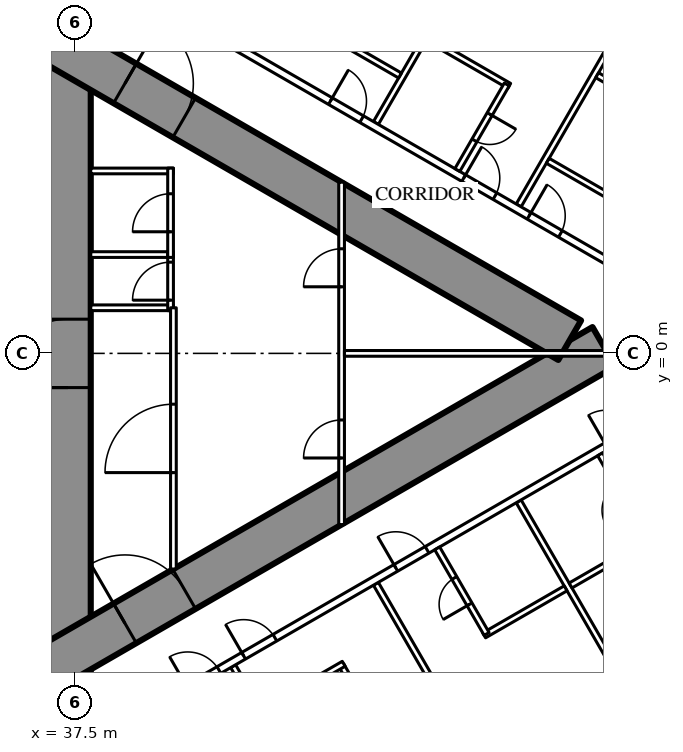
"""IFC4 building model, lengths in metres.
Left out: names, types, materials, properties, quantities, classifications, styles, units other than length and angle.
Written with IfcOpenShell. Run it as: python <this file> out.ifc"""

import sys

from ifc_helpers import new_model, si_unit, direction, frame, frame_2d, origin, place, context, subcontext, project, spatial, rectangle, extrude, element, fill, save


model = new_model("IFC4")
c1 = context("Model", 3, precision=1e-05, world=origin(), true_north=direction((0.0, 1.0)))
c2 = subcontext(c1, "Body", "Model", "MODEL_VIEW")
j1 = project(units=[si_unit("LENGTHUNIT", "METRE"), si_unit("PLANEANGLEUNIT", "RADIAN")], contexts=[c1])
p1 = place(None, origin())
s1 = spatial("IfcSite", under=j1, at=p1, CompositionType="ELEMENT")
p2 = place(p1, origin())
s2 = spatial("IfcBuilding", under=s1, at=p2, CompositionType="ELEMENT")
p3 = place(p2, frame((0.0, 0.0, 32.0)))
s3 = spatial("IfcBuildingStorey", under=s2, at=p3, CompositionType="ELEMENT", Elevation=32.0)
p4 = place(p3, frame((37.3, -8.6, 0.0), z_axis=(0.0, 0.0, 1.0), x_axis=(0.0, 1.0, 0.0)))
e1 = element("IfcWall", 1, at=p4, inside=s3, PredefinedType="SHEAR", context=c2, shape_type="SweptSolid", body=[
    extrude(rectangle(XDim=17.2, YDim=1.2, at=frame_2d((8.6, 0.0))), origin(), (0.0, 0.0, 1.0), 3.5),
])
p5 = place(p4, frame((7.7, 0.0, 0.0)))
e2 = element("IfcOpeningElement", 2, at=p5, cuts=e1, PredefinedType="OPENING", context=c2, shape_type="SweptSolid", body=[
    extrude(rectangle(XDim=1.8, YDim=2.2, at=frame_2d((0.9, 1.1))), frame((0.0, 0.61, 0.0), z_axis=(0.0, -1.0, 0.0), x_axis=(1.0, 0.0, 0.0)), (0.0, 0.0, 1.0), 1.22),
])
p6 = place(p3, frame((27.2, -13.8, 0.0), z_axis=(0.0, 0.0, 1.0), x_axis=(0.866027159892, 0.499996958321, 0.0)))
e3 = element("IfcWall", 3, at=p6, inside=s3, PredefinedType="SHEAR", context=c2, shape_type="SweptSolid", body=[
    extrude(rectangle(XDim=27.947, YDim=1.2, at=frame_2d((13.973, 0.0))), origin(), (0.0, 0.0, 1.0), 3.5),
])
p7 = place(p6, frame((4.6, 0.0, 0.0)))
e4 = element("IfcOpeningElement", 4, at=p7, cuts=e3, PredefinedType="OPENING", context=c2, shape_type="SweptSolid", body=[
    extrude(rectangle(XDim=1.0, YDim=2.2, at=frame_2d((0.5, 1.1))), frame((0.0, 0.61, 0.0), z_axis=(0.0, -1.0, 0.0), x_axis=(1.0, 0.0, 0.0)), (0.0, 0.0, 1.0), 1.22),
])
p8 = place(p6, frame((13.395, 0.0, 0.0)))
e5 = element("IfcOpeningElement", 5, at=p8, cuts=e3, PredefinedType="OPENING", context=c2, shape_type="SweptSolid", body=[
    extrude(rectangle(XDim=1.8, YDim=2.2, at=frame_2d((0.9, 1.1))), frame((0.0, 0.61, 0.0), z_axis=(0.0, -1.0, 0.0), x_axis=(1.0, 0.0, 0.0)), (0.0, 0.0, 1.0), 1.22),
])
p9 = place(p3, frame((27.2, 13.8, 0.0), z_axis=(0.0, 0.0, 1.0), x_axis=(0.866024515034, -0.500001539357, 0.0)))
e6 = element("IfcWall", 6, at=p9, inside=s3, PredefinedType="SHEAR", context=c2, shape_type="SweptSolid", body=[
    extrude(rectangle(XDim=26.907, YDim=1.2, at=frame_2d((13.454, 0.0))), origin(), (0.0, 0.0, 1.0), 3.5),
])
p10 = place(p9, frame((4.6, 0.0, 0.0)))
e7 = element("IfcOpeningElement", 7, at=p10, cuts=e6, PredefinedType="OPENING", context=c2, shape_type="SweptSolid", body=[
    extrude(rectangle(XDim=1.0, YDim=2.2, at=frame_2d((0.5, 1.1))), frame((0.0, 0.61, 0.0), z_axis=(0.0, -1.0, 0.0), x_axis=(1.0, 0.0, 0.0)), (0.0, 0.0, 1.0), 1.22),
])
p11 = place(p9, frame((13.395, 0.0, 0.0)))
e8 = element("IfcOpeningElement", 8, at=p11, cuts=e6, PredefinedType="OPENING", context=c2, shape_type="SweptSolid", body=[
    extrude(rectangle(XDim=1.8, YDim=2.2, at=frame_2d((0.9, 1.1))), frame((0.0, 0.61, 0.0), z_axis=(0.0, -1.0, 0.0), x_axis=(1.0, 0.0, 0.0)), (0.0, 0.0, 1.0), 1.22),
])
p12 = place(p3, frame((41.647, -8.23, 0.0), z_axis=(0.0, 0.0, 1.0), x_axis=(0.49998590462, -0.866033541603, 0.0)))
e9 = element("IfcWall", 9, at=p12, inside=s3, PredefinedType="PARTITIONING", context=c2, shape_type="SweptSolid", body=[
    extrude(rectangle(XDim=12.621, YDim=0.15, at=frame_2d((6.311, 0.0))), origin(), (0.0, 0.0, 1.0), 3.25),
])
p13 = place(p3, frame((45.403, -6.062, 0.0), z_axis=(0.0, 0.0, 1.0), x_axis=(0.500007077968, -0.866021317279, 0.0)))
e10 = element("IfcWall", 10, at=p13, inside=s3, PredefinedType="PARTITIONING", context=c2, shape_type="SweptSolid", body=[
    extrude(rectangle(XDim=12.721, YDim=0.15, at=frame_2d((6.361, 0.0))), origin(), (0.0, 0.0, 1.0), 3.25),
])
p14 = place(p3, frame((49.159, -3.893, 0.0), z_axis=(0.0, 0.0, 1.0), x_axis=(0.499998773722, -0.866026111775, 0.0)))
e11 = element("IfcWall", 11, at=p14, inside=s3, PredefinedType="PARTITIONING", context=c2, shape_type="SweptSolid", body=[
    extrude(rectangle(XDim=9.892, YDim=0.15, at=frame_2d((4.946, 0.0))), origin(), (0.0, 0.0, 1.0), 2.25),
])
p15 = place(p3, frame((45.403, 6.062, 0.0), z_axis=(0.0, 0.0, 1.0), x_axis=(0.500013434677, 0.866017647131, 0.0)))
e12 = element("IfcWall", 12, at=p15, inside=s3, PredefinedType="PARTITIONING", context=c2, shape_type="SweptSolid", body=[
    extrude(rectangle(XDim=9.902, YDim=0.15, at=frame_2d((4.951, 0.0))), origin(), (0.0, 0.0, 1.0), 2.25),
])
p16 = place(p3, frame((49.159, 3.893, 0.0), z_axis=(0.0, 0.0, 1.0), x_axis=(0.499995664361, 0.866027906952, 0.0)))
e13 = element("IfcWall", 13, at=p16, inside=s3, PredefinedType="PARTITIONING", context=c2, shape_type="SweptSolid", body=[
    extrude(rectangle(XDim=12.711, YDim=0.15, at=frame_2d((6.356, 0.0))), origin(), (0.0, 0.0, 1.0), 3.25),
])
p17 = place(p3, frame((37.96, -10.243, 0.0), z_axis=(0.0, 0.0, 1.0), x_axis=(0.866026429433, 0.499998223521, 0.0)))
e14 = element("IfcWall", 14, at=p17, inside=s3, PredefinedType="PARTITIONING", context=c2, shape_type="SweptSolid", body=[
    extrude(rectangle(XDim=20.487, YDim=0.2, at=frame_2d((10.243, 0.0))), origin(), (0.0, 0.0, 1.0), 3.25),
])
p18 = place(p17, frame((4.575, 0.0, 0.0)))
e15 = element("IfcOpeningElement", 15, at=p18, cuts=e14, PredefinedType="OPENING", context=c2, shape_type="SweptSolid", body=[
    extrude(rectangle(XDim=0.95, YDim=2.2, at=frame_2d((0.475, 1.1))), frame((0.0, 0.11, 0.0), z_axis=(0.0, -1.0, 0.0), x_axis=(1.0, 0.0, 0.0)), (0.0, 0.0, 1.0), 0.22),
])
p19 = place(p17, frame((9.199, 0.0, 0.0)))
e16 = element("IfcOpeningElement", 16, at=p19, cuts=e14, PredefinedType="OPENING", context=c2, shape_type="SweptSolid", body=[
    extrude(rectangle(XDim=0.95, YDim=2.2, at=frame_2d((0.475, 1.1))), frame((0.0, 0.11, 0.0), z_axis=(0.0, -1.0, 0.0), x_axis=(1.0, 0.0, 0.0)), (0.0, 0.0, 1.0), 0.22),
])
p20 = place(p17, frame((15.599, 0.0, 0.0)))
e17 = element("IfcOpeningElement", 17, at=p20, cuts=e14, PredefinedType="OPENING", context=c2, shape_type="SweptSolid", body=[
    extrude(rectangle(XDim=0.95, YDim=2.2, at=frame_2d((0.475, 1.1))), frame((0.0, 0.11, 0.0), z_axis=(0.0, -1.0, 0.0), x_axis=(1.0, 0.0, 0.0)), (0.0, 0.0, 1.0), 0.22),
])
p21 = place(p17, frame((2.875, 0.0, 0.0)))
e18 = element("IfcOpeningElement", 18, at=p21, cuts=e14, PredefinedType="OPENING", context=c2, shape_type="SweptSolid", body=[
    extrude(rectangle(XDim=0.95, YDim=2.2, at=frame_2d((0.475, 1.1))), frame((0.0, 0.11, 0.0), z_axis=(0.0, -1.0, 0.0), x_axis=(1.0, 0.0, 0.0)), (0.0, 0.0, 1.0), 0.22),
])
p22 = place(p3, frame((41.619, 8.131, 0.0), z_axis=(0.0, 0.0, 1.0), x_axis=(0.86603245327, -0.499987789734, 0.0)))
e19 = element("IfcWall", 19, at=p22, inside=s3, PredefinedType="PARTITIONING", context=c2, shape_type="SweptSolid", body=[
    extrude(rectangle(XDim=16.142, YDim=0.2, at=frame_2d((8.071, 0.0))), origin(), (0.0, 0.0, 1.0), 3.25),
])
p23 = place(p22, frame((9.024, 0.0, 0.0)))
e20 = element("IfcOpeningElement", 20, at=p23, cuts=e19, PredefinedType="OPENING", context=c2, shape_type="SweptSolid", body=[
    extrude(rectangle(XDim=0.95, YDim=2.2, at=frame_2d((0.475, 1.1))), frame((0.0, 0.11, 0.0), z_axis=(0.0, -1.0, 0.0), x_axis=(1.0, 0.0, 0.0)), (0.0, 0.0, 1.0), 0.22),
])
p24 = place(p22, frame((7.037, 0.0, 0.0)))
e21 = element("IfcOpeningElement", 21, at=p24, cuts=e19, PredefinedType="OPENING", context=c2, shape_type="SweptSolid", body=[
    extrude(rectangle(XDim=0.95, YDim=2.2, at=frame_2d((0.475, 1.1))), frame((0.0, 0.11, 0.0), z_axis=(0.0, -1.0, 0.0), x_axis=(1.0, 0.0, 0.0)), (0.0, 0.0, 1.0), 0.22),
])
p25 = place(p22, frame((2.987, 0.0, 0.0)))
e22 = element("IfcOpeningElement", 22, at=p25, cuts=e19, PredefinedType="OPENING", context=c2, shape_type="SweptSolid", body=[
    extrude(rectangle(XDim=0.95, YDim=2.2, at=frame_2d((0.475, 1.1))), frame((0.0, 0.11, 0.0), z_axis=(0.0, -1.0, 0.0), x_axis=(1.0, 0.0, 0.0)), (0.0, 0.0, 1.0), 0.22),
])
p26 = place(p3, frame((44.491, -8.205, 0.0), z_axis=(0.0, 0.0, 1.0), x_axis=(0.500047596559, -0.865997922154, 0.0)))
e23 = element("IfcWall", 23, at=p26, inside=s3, PredefinedType="PARTITIONING", context=c2, shape_type="SweptSolid", body=[
    extrude(rectangle(XDim=2.6, YDim=0.15, at=frame_2d((1.3, 0.0))), origin(), (0.0, 0.0, 1.0), 3.25),
])
p27 = place(p26, frame((0.9, 0.0, 0.0)))
e24 = element("IfcOpeningElement", 24, at=p27, cuts=e23, PredefinedType="OPENING", context=c2, shape_type="SweptSolid", body=[
    extrude(rectangle(XDim=0.8, YDim=2.2, at=frame_2d((0.4, 1.1))), frame((0.0, 0.085, 0.0), z_axis=(0.0, -1.0, 0.0), x_axis=(1.0, 0.0, 0.0)), (0.0, 0.0, 1.0), 0.17),
])
for number, where, z_axis, x_axis in (
    (25, (42.412, -9.405, 0.0), (0.0, 0.0, 1.0), (0.866, 0.5, 0.0)),
    (26, (48.251, -7.42, 0.0), (0.0, 0.0, 1.0), (0.866, 0.5, 0.0)),
):
    element("IfcWall", number, at=place(p3, frame(where, z_axis=z_axis, x_axis=x_axis)), inside=s3, PredefinedType="PARTITIONING", context=c2, shape_type="SweptSolid", body=[
        extrude(rectangle(XDim=2.475, YDim=0.15, at=frame_2d((1.237, 0.0))), origin(), (0.0, 0.0, 1.0), 3.25),
    ])
p28 = place(p3, frame((47.016, -5.13, 0.0), z_axis=(0.0, 0.0, 1.0), x_axis=(0.500006934395, -0.866021400173, 0.0)))
e27 = element("IfcWall", 27, at=p28, inside=s3, PredefinedType="PARTITIONING", context=c2, shape_type="SweptSolid", body=[
    extrude(rectangle(XDim=2.6, YDim=0.15, at=frame_2d((1.3, 0.0))), origin(), (0.0, 0.0, 1.0), 3.25),
])
p29 = place(p28, frame((0.9, 0.0, 0.0)))
e28 = element("IfcOpeningElement", 28, at=p29, cuts=e27, PredefinedType="OPENING", context=c2, shape_type="SweptSolid", body=[
    extrude(rectangle(XDim=0.8, YDim=2.2, at=frame_2d((0.4, 1.1))), frame((0.0, 0.085, 0.0), z_axis=(0.0, -1.0, 0.0), x_axis=(1.0, 0.0, 0.0)), (0.0, 0.0, 1.0), 0.17),
])
p30 = place(p3, frame((50.524, -6.107, 0.0), z_axis=(0.0, 0.0, 1.0), x_axis=(0.866031185235, 0.4999899861, 0.0)))
e29 = element("IfcWall", 29, at=p30, inside=s3, PredefinedType="PARTITIONING", context=c2, shape_type="SweptSolid", body=[
    extrude(rectangle(XDim=2.475, YDim=0.15, at=frame_2d((1.238, 0.0))), origin(), (0.0, 0.0, 1.0), 3.25),
])
p31 = place(p3, frame((51.303, -2.656, 0.0), z_axis=(0.0, 0.0, 1.0), x_axis=(0.500047596559, -0.865997922154, 0.0)))
e30 = element("IfcWall", 30, at=p31, inside=s3, PredefinedType="PARTITIONING", context=c2, shape_type="SweptSolid", body=[
    extrude(rectangle(XDim=2.6, YDim=0.15, at=frame_2d((1.3, 0.0))), origin(), (0.0, 0.0, 1.0), 3.25),
])
p32 = place(p31, frame((0.9, 0.0, 0.0)))
e31 = element("IfcOpeningElement", 31, at=p32, cuts=e30, PredefinedType="OPENING", context=c2, shape_type="SweptSolid", body=[
    extrude(rectangle(XDim=0.8, YDim=2.2, at=frame_2d((0.4, 1.1))), frame((0.0, 0.085, 0.0), z_axis=(0.0, -1.0, 0.0), x_axis=(1.0, 0.0, 0.0)), (0.0, 0.0, 1.0), 0.17),
])
p33 = place(p3, frame((51.224, 7.32, 0.0), z_axis=(0.0, 0.0, 1.0), x_axis=(0.866031185235, -0.4999899861, 0.0)))
e32 = element("IfcWall", 32, at=p33, inside=s3, PredefinedType="PARTITIONING", context=c2, shape_type="SweptSolid", body=[
    extrude(rectangle(XDim=2.475, YDim=0.15, at=frame_2d((1.238, 0.0))), origin(), (0.0, 0.0, 1.0), 3.25),
])
p34 = place(p3, frame((49.925, 5.068, 0.0), z_axis=(0.0, 0.0, 1.0), x_axis=(0.866006523861, -0.500032699561, 0.0)))
e33 = element("IfcWall", 33, at=p34, inside=s3, PredefinedType="PARTITIONING", context=c2, shape_type="SweptSolid", body=[
    extrude(rectangle(XDim=2.475, YDim=0.15, at=frame_2d((1.237, 0.0))), origin(), (0.0, 0.0, 1.0), 3.25),
])
p35 = place(p3, frame((46.768, 8.276, 0.0), z_axis=(0.0, 0.0, 1.0), x_axis=(0.866031185235, -0.4999899861, 0.0)))
e34 = element("IfcWall", 34, at=p35, inside=s3, PredefinedType="PARTITIONING", context=c2, shape_type="SweptSolid", body=[
    extrude(rectangle(XDim=2.475, YDim=0.15, at=frame_2d((1.238, 0.0))), origin(), (0.0, 0.0, 1.0), 3.25),
])
p36 = place(p3, frame((47.546, 4.824, 0.0), z_axis=(0.0, 0.0, 1.0), x_axis=(0.500006934395, 0.866021400173, 0.0)))
e35 = element("IfcWall", 35, at=p36, inside=s3, PredefinedType="PARTITIONING", context=c2, shape_type="SweptSolid", body=[
    extrude(rectangle(XDim=2.6, YDim=0.15, at=frame_2d((1.3, 0.0))), origin(), (0.0, 0.0, 1.0), 3.25),
])
p37 = place(p36, frame((0.9, 0.0, 0.0)))
e36 = element("IfcOpeningElement", 36, at=p37, cuts=e35, PredefinedType="OPENING", context=c2, shape_type="SweptSolid", body=[
    extrude(rectangle(XDim=0.8, YDim=2.2, at=frame_2d((0.4, 1.1))), frame((0.0, 0.085, 0.0), z_axis=(0.0, -1.0, 0.0), x_axis=(1.0, 0.0, 0.0)), (0.0, 0.0, 1.0), 0.17),
])
p38 = place(p3, frame((43.895, 8.549, 0.0), z_axis=(0.0, 0.0, 1.0), x_axis=(0.866031185235, -0.4999899861, 0.0)))
e37 = element("IfcWall", 37, at=p38, inside=s3, PredefinedType="PARTITIONING", context=c2, shape_type="SweptSolid", body=[
    extrude(rectangle(XDim=2.475, YDim=0.15, at=frame_2d((1.238, 0.0))), origin(), (0.0, 0.0, 1.0), 3.25),
])
for number, where, z_axis, x_axis in (
    (38, (37.9, 1.2, 0.0), (0.0, 0.0, 1.0), (1.0, 0.0, 0.0)),
    (39, (37.9, 2.6, 0.0), (0.0, 0.0, 1.0), (1.0, 0.0, 0.0)),
    (40, (37.9, 4.8, 0.0), (0.0, 0.0, 1.0), (1.0, 0.0, 0.0)),
):
    element("IfcWall", number, at=place(p3, frame(where, z_axis=z_axis, x_axis=x_axis)), inside=s3, PredefinedType="PARTITIONING", context=c2, shape_type="SweptSolid", body=[
        extrude(rectangle(XDim=2.175, YDim=0.15, at=frame_2d((1.087, 0.0))), origin(), (0.0, 0.0, 1.0), 3.25),
    ])
p39 = place(p3, frame((40.0, 1.125, 0.0), z_axis=(0.0, 0.0, 1.0), x_axis=(0.0, 1.0, 0.0)))
e41 = element("IfcWall", 41, at=p39, inside=s3, PredefinedType="PARTITIONING", context=c2, shape_type="SweptSolid", body=[
    extrude(rectangle(XDim=1.55, YDim=0.15, at=frame_2d((0.775, 0.0))), origin(), (0.0, 0.0, 1.0), 3.25),
])
p40 = place(p39, frame((0.275, 0.0, 0.0)))
e42 = element("IfcOpeningElement", 42, at=p40, cuts=e41, PredefinedType="OPENING", context=c2, shape_type="SweptSolid", body=[
    extrude(rectangle(XDim=1.0, YDim=2.2, at=frame_2d((0.5, 1.1))), frame((0.0, 0.085, 0.0), z_axis=(0.0, -1.0, 0.0), x_axis=(1.0, 0.0, 0.0)), (0.0, 0.0, 1.0), 0.17),
])
p41 = place(p3, frame((40.0, 2.525, 0.0), z_axis=(0.0, 0.0, 1.0), x_axis=(0.0, 1.0, 0.0)))
e43 = element("IfcWall", 43, at=p41, inside=s3, PredefinedType="PARTITIONING", context=c2, shape_type="SweptSolid", body=[
    extrude(rectangle(XDim=2.35, YDim=0.15, at=frame_2d((1.175, 0.0))), origin(), (0.0, 0.0, 1.0), 3.25),
])
p42 = place(p41, frame((0.675, 0.0, 0.0)))
e44 = element("IfcOpeningElement", 44, at=p42, cuts=e43, PredefinedType="OPENING", context=c2, shape_type="SweptSolid", body=[
    extrude(rectangle(XDim=1.0, YDim=2.2, at=frame_2d((0.5, 1.1))), frame((0.0, 0.085, 0.0), z_axis=(0.0, -1.0, 0.0), x_axis=(1.0, 0.0, 0.0)), (0.0, 0.0, 1.0), 0.17),
])
p43 = place(p3, frame((40.075, -5.674, 0.0), z_axis=(0.0, 0.0, 1.0), x_axis=(0.0, 1.0, 0.0)))
e45 = element("IfcWall", 45, at=p43, inside=s3, PredefinedType="PARTITIONING", context=c2, shape_type="SweptSolid", body=[
    extrude(rectangle(XDim=6.874, YDim=0.15, at=frame_2d((3.437, 0.0))), origin(), (0.0, 0.0, 1.0), 3.25),
])
p44 = place(p43, frame((2.537, 0.0, 0.0)))
e46 = element("IfcOpeningElement", 46, at=p44, cuts=e45, PredefinedType="OPENING", context=c2, shape_type="SweptSolid", body=[
    extrude(rectangle(XDim=1.8, YDim=2.2, at=frame_2d((0.9, 1.1))), frame((0.0, 0.085, 0.0), z_axis=(0.0, -1.0, 0.0), x_axis=(1.0, 0.0, 0.0)), (0.0, 0.0, 1.0), 0.17),
])
p45 = place(p3, frame((44.5, -4.505, 0.0), z_axis=(0.0, 0.0, 1.0), x_axis=(0.0, 1.0, 0.0)))
e47 = element("IfcWall", 47, at=p45, inside=s3, PredefinedType="PARTITIONING", context=c2, shape_type="SweptSolid", body=[
    extrude(rectangle(XDim=9.009, YDim=0.15, at=frame_2d((4.505, 0.0))), origin(), (0.0, 0.0, 1.0), 2.45),
])
p46 = place(p45, frame((1.752, 0.0, 0.0)))
e48 = element("IfcOpeningElement", 48, at=p46, cuts=e47, PredefinedType="OPENING", context=c2, shape_type="SweptSolid", body=[
    extrude(rectangle(XDim=1.0, YDim=2.2, at=frame_2d((0.5, 1.1))), frame((0.0, 0.085, 0.0), z_axis=(0.0, -1.0, 0.0), x_axis=(1.0, 0.0, 0.0)), (0.0, 0.0, 1.0), 0.17),
])
p47 = place(p45, frame((6.257, 0.0, 0.0)))
e49 = element("IfcOpeningElement", 49, at=p47, cuts=e47, PredefinedType="OPENING", context=c2, shape_type="SweptSolid", body=[
    extrude(rectangle(XDim=1.0, YDim=2.2, at=frame_2d((0.5, 1.1))), frame((0.0, 0.085, 0.0), z_axis=(0.0, -1.0, 0.0), x_axis=(1.0, 0.0, 0.0)), (0.0, 0.0, 1.0), 0.17),
])
p48 = place(p3, frame((44.575, 0.0, 0.0), z_axis=(0.0, 0.0, 1.0), x_axis=(1.0, 0.0, 0.0)))
e50 = element("IfcWall", 50, at=p48, inside=s3, PredefinedType="PARTITIONING", context=c2, shape_type="SweptSolid", body=[
    extrude(rectangle(XDim=7.727, YDim=0.15, at=frame_2d((3.864, 0.0))), origin(), (0.0, 0.0, 1.0), 2.25),
])
p49 = place(p18, origin())
e51 = element("IfcDoor", 51, at=p49, inside=s3, OperationType="SINGLE_SWING_LEFT", PredefinedType="DOOR", context=c2, shape_type="SweptSolid", body=[
    extrude(rectangle(XDim=0.95, YDim=2.2, at=frame_2d((0.475, 1.1))), frame((0.0, 0.025, 0.0), z_axis=(0.0, -1.0, 0.0), x_axis=(1.0, 0.0, 0.0)), (0.0, 0.0, 1.0), 0.05),
])
fill(e15, e51)
p50 = place(p29, origin())
e52 = element("IfcDoor", 52, at=p50, inside=s3, OperationType="SINGLE_SWING_RIGHT", PredefinedType="DOOR", context=c2, shape_type="SweptSolid", body=[
    extrude(rectangle(XDim=0.8, YDim=2.2, at=frame_2d((0.4, 1.1))), frame((0.0, 0.025, 0.0), z_axis=(0.0, -1.0, 0.0), x_axis=(1.0, 0.0, 0.0)), (0.0, 0.0, 1.0), 0.05),
])
fill(e28, e52)
p51 = place(p19, origin())
e53 = element("IfcDoor", 53, at=p51, inside=s3, OperationType="SINGLE_SWING_LEFT", PredefinedType="DOOR", context=c2, shape_type="SweptSolid", body=[
    extrude(rectangle(XDim=0.95, YDim=2.2, at=frame_2d((0.475, 1.1))), frame((0.0, 0.025, 0.0), z_axis=(0.0, -1.0, 0.0), x_axis=(1.0, 0.0, 0.0)), (0.0, 0.0, 1.0), 0.05),
])
fill(e16, e53)
p52 = place(p23, origin())
e54 = element("IfcDoor", 54, at=p52, inside=s3, OperationType="SINGLE_SWING_LEFT", PredefinedType="DOOR", context=c2, shape_type="SweptSolid", body=[
    extrude(rectangle(XDim=0.95, YDim=2.2, at=frame_2d((0.475, 1.1))), frame((0.0, 0.025, 0.0), z_axis=(0.0, -1.0, 0.0), x_axis=(1.0, 0.0, 0.0)), (0.0, 0.0, 1.0), 0.05),
])
fill(e20, e54)
p53 = place(p37, origin())
e55 = element("IfcDoor", 55, at=p53, inside=s3, OperationType="SINGLE_SWING_RIGHT", PredefinedType="DOOR", context=c2, shape_type="SweptSolid", body=[
    extrude(rectangle(XDim=0.8, YDim=2.2, at=frame_2d((0.4, 1.1))), frame((0.0, 0.025, 0.0), z_axis=(0.0, -1.0, 0.0), x_axis=(1.0, 0.0, 0.0)), (0.0, 0.0, 1.0), 0.05),
])
fill(e36, e55)
p54 = place(p24, origin())
e56 = element("IfcDoor", 56, at=p54, inside=s3, OperationType="SINGLE_SWING_LEFT", PredefinedType="DOOR", context=c2, shape_type="SweptSolid", body=[
    extrude(rectangle(XDim=0.95, YDim=2.2, at=frame_2d((0.475, 1.1))), frame((0.0, 0.025, 0.0), z_axis=(0.0, -1.0, 0.0), x_axis=(1.0, 0.0, 0.0)), (0.0, 0.0, 1.0), 0.05),
])
fill(e21, e56)
p55 = place(p25, origin())
e57 = element("IfcDoor", 57, at=p55, inside=s3, OperationType="SINGLE_SWING_LEFT", PredefinedType="DOOR", context=c2, shape_type="SweptSolid", body=[
    extrude(rectangle(XDim=0.95, YDim=2.2, at=frame_2d((0.475, 1.1))), frame((0.0, 0.025, 0.0), z_axis=(0.0, -1.0, 0.0), x_axis=(1.0, 0.0, 0.0)), (0.0, 0.0, 1.0), 0.05),
])
fill(e22, e57)
p56 = place(p21, origin())
e58 = element("IfcDoor", 58, at=p56, inside=s3, OperationType="SINGLE_SWING_LEFT", PredefinedType="DOOR", context=c2, shape_type="SweptSolid", body=[
    extrude(rectangle(XDim=0.95, YDim=2.2, at=frame_2d((0.475, 1.1))), frame((0.0, 0.025, 0.0), z_axis=(0.0, -1.0, 0.0), x_axis=(1.0, 0.0, 0.0)), (0.0, 0.0, 1.0), 0.05),
])
fill(e18, e58)
p57 = place(p40, origin())
e59 = element("IfcDoor", 59, at=p57, inside=s3, OperationType="SINGLE_SWING_LEFT", PredefinedType="DOOR", context=c2, shape_type="SweptSolid", body=[
    extrude(rectangle(XDim=1.0, YDim=2.2, at=frame_2d((0.5, 1.1))), frame((0.0, 0.025, 0.0), z_axis=(0.0, -1.0, 0.0), x_axis=(1.0, 0.0, 0.0)), (0.0, 0.0, 1.0), 0.05),
])
fill(e42, e59)
p58 = place(p42, origin())
e60 = element("IfcDoor", 60, at=p58, inside=s3, OperationType="SINGLE_SWING_LEFT", PredefinedType="DOOR", context=c2, shape_type="SweptSolid", body=[
    extrude(rectangle(XDim=1.0, YDim=2.2, at=frame_2d((0.5, 1.1))), frame((0.0, 0.025, 0.0), z_axis=(0.0, -1.0, 0.0), x_axis=(1.0, 0.0, 0.0)), (0.0, 0.0, 1.0), 0.05),
])
fill(e44, e60)
p59 = place(p44, origin())
e61 = element("IfcDoor", 61, at=p59, inside=s3, OperationType="DOUBLE_DOOR_SINGLE_SWING", PredefinedType="DOOR", context=c2, shape_type="SweptSolid", body=[
    extrude(rectangle(XDim=1.8, YDim=2.2, at=frame_2d((0.9, 1.1))), frame((0.0, 0.025, 0.0), z_axis=(0.0, -1.0, 0.0), x_axis=(1.0, 0.0, 0.0)), (0.0, 0.0, 1.0), 0.05),
])
fill(e46, e61)
p60 = place(p46, origin())
e62 = element("IfcDoor", 62, at=p60, inside=s3, OperationType="SINGLE_SWING_LEFT", PredefinedType="DOOR", context=c2, shape_type="SweptSolid", body=[
    extrude(rectangle(XDim=1.0, YDim=2.2, at=frame_2d((0.5, 1.1))), frame((0.0, 0.025, 0.0), z_axis=(0.0, -1.0, 0.0), x_axis=(1.0, 0.0, 0.0)), (0.0, 0.0, 1.0), 0.05),
])
fill(e48, e62)
p61 = place(p47, origin())
e63 = element("IfcDoor", 63, at=p61, inside=s3, OperationType="SINGLE_SWING_LEFT", PredefinedType="DOOR", context=c2, shape_type="SweptSolid", body=[
    extrude(rectangle(XDim=1.0, YDim=2.2, at=frame_2d((0.5, 1.1))), frame((0.0, 0.025, 0.0), z_axis=(0.0, -1.0, 0.0), x_axis=(1.0, 0.0, 0.0)), (0.0, 0.0, 1.0), 0.05),
])
fill(e49, e63)
p62 = place(p8, origin())
e64 = element("IfcDoor", 64, at=p62, inside=s3, OperationType="DOUBLE_DOOR_SINGLE_SWING", PredefinedType="DOOR", context=c2, shape_type="SweptSolid", body=[
    extrude(rectangle(XDim=1.8, YDim=2.2, at=frame_2d((0.9, 1.1))), frame((0.0, 0.025, 0.0), z_axis=(0.0, -1.0, 0.0), x_axis=(1.0, 0.0, 0.0)), (0.0, 0.0, 1.0), 0.05),
])
fill(e5, e64)
p63 = place(p11, origin())
e65 = element("IfcDoor", 65, at=p63, inside=s3, OperationType="DOUBLE_DOOR_SINGLE_SWING", PredefinedType="DOOR", context=c2, shape_type="SweptSolid", body=[
    extrude(rectangle(XDim=1.8, YDim=2.2, at=frame_2d((0.9, 1.1))), frame((0.0, 0.025, 0.0), z_axis=(0.0, -1.0, 0.0), x_axis=(1.0, 0.0, 0.0)), (0.0, 0.0, 1.0), 0.05),
])
fill(e8, e65)
p64 = place(p5, origin())
e66 = element("IfcDoor", 66, at=p64, inside=s3, OperationType="DOUBLE_DOOR_SINGLE_SWING", PredefinedType="DOOR", context=c2, shape_type="SweptSolid", body=[
    extrude(rectangle(XDim=1.8, YDim=2.2, at=frame_2d((0.9, 1.1))), frame((0.0, 0.025, 0.0), z_axis=(0.0, -1.0, 0.0), x_axis=(1.0, 0.0, 0.0)), (0.0, 0.0, 1.0), 0.05),
])
fill(e2, e66)
save(model, sys.argv[1])
